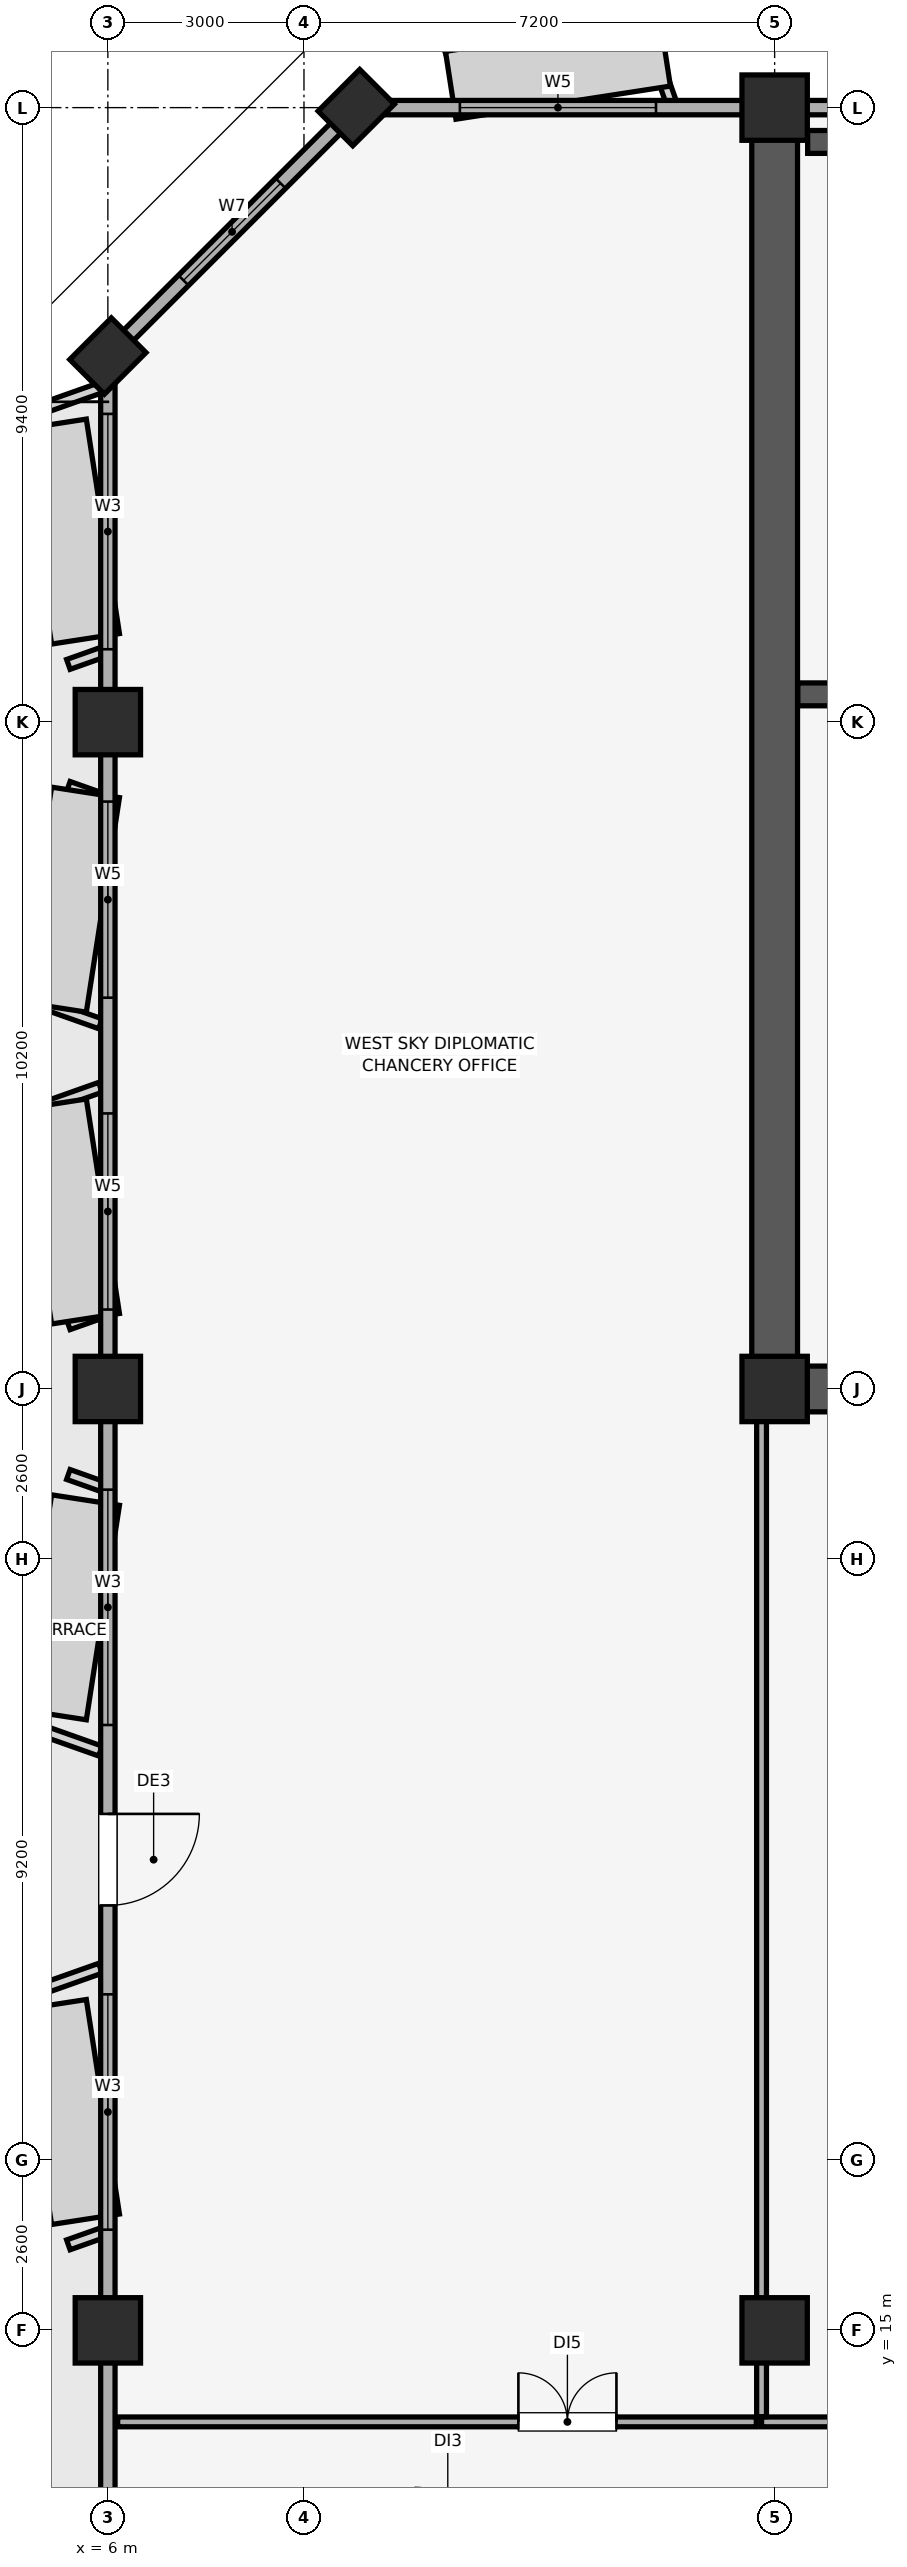
"""IFC4 building model, lengths in metres.
Left out: names, types, materials, properties, quantities, classifications, styles, units other than length and angle.
Written with IfcOpenShell. Run it as: python <this file> out.ifc"""

import sys

from ifc_helpers import new_model, si_unit, direction, frame, frame_2d, origin, origin_2d, place, context, subcontext, project, spatial, rectangle, extrude, element, fill, save


model = new_model("IFC4")
c1 = context("Model", 3, precision=1e-05, world=origin(), true_north=direction((0.0, 1.0)))
c2 = subcontext(c1, "Body", "Model", "MODEL_VIEW")
j1 = project(units=[si_unit("LENGTHUNIT", "METRE"), si_unit("PLANEANGLEUNIT", "RADIAN")], contexts=[c1])
p1 = place(None, origin())
s1 = spatial("IfcSite", under=j1, at=p1, CompositionType="ELEMENT")
p2 = place(p1, origin())
s2 = spatial("IfcBuilding", under=s1, at=p2, CompositionType="ELEMENT")
p3 = place(p2, frame((0.0, 0.0, 229.15)))
s3 = spatial("IfcBuildingStorey", under=s2, at=p3, CompositionType="ELEMENT", Elevation=229.15)
for number, where, z_axis, x_axis in (
    (1, (6.0, 15.0, 0.0), (0.0, 0.0, 1.0), (1.0, 0.0, 0.0)),
    (2, (6.0, 29.4, 0.0), (0.0, 0.0, 1.0), (1.0, 0.0, 0.0)),
    (3, (6.0, 39.6, 0.0), (0.0, 0.0, 1.0), (1.0, 0.0, 0.0)),
):
    element("IfcColumn", number, at=place(p3, frame(where, z_axis=z_axis, x_axis=x_axis)), inside=s3, PredefinedType="COLUMN", context=c2, shape_type="SweptSolid", body=[
        extrude(rectangle(XDim=1.0, YDim=1.0, at=origin_2d()), origin(), (0.0, 0.0, 1.0), 3.71),
    ])
for number, where, z_axis, x_axis in (
    (4, (9.8, 49.0, 0.0), (0.0, 0.0, 1.0), (0.707, 0.707, 0.0)),
    (5, (6.0, 45.2, 0.0), (0.0, 0.0, 1.0), (0.707, 0.707, 0.0)),
):
    element("IfcColumn", number, at=place(p3, frame(where, z_axis=z_axis, x_axis=x_axis)), inside=s3, PredefinedType="PILASTER", context=c2, shape_type="SweptSolid", body=[
        extrude(rectangle(XDim=0.9, YDim=0.75, at=origin_2d()), origin(), (0.0, 0.0, 1.0), 3.71),
    ])
for number, where, z_axis, x_axis in (
    (6, (16.2, 15.0, 0.0), (0.0, 0.0, 1.0), (1.0, 0.0, 0.0)),
    (7, (16.2, 29.4, 0.0), (0.0, 0.0, 1.0), (1.0, 0.0, 0.0)),
    (8, (16.2, 49.0, 0.0), (0.0, 0.0, 1.0), (1.0, 0.0, 0.0)),
):
    element("IfcColumn", number, at=place(p3, frame(where, z_axis=z_axis, x_axis=x_axis)), inside=s3, PredefinedType="COLUMN", context=c2, shape_type="SweptSolid", body=[
        extrude(rectangle(XDim=1.0, YDim=1.0, at=origin_2d()), origin(), (0.0, 0.0, 1.0), 3.71),
    ])
p4 = place(p3, frame((74.2, 49.0, 0.0), z_axis=(0.0, 0.0, 1.0), x_axis=(-1.0, 0.0, 0.0)))
e9 = element("IfcWall", 9, at=p4, inside=s3, PredefinedType="SOLIDWALL", context=c2, shape_type="SweptSolid", body=[
    extrude(rectangle(XDim=64.4, YDim=0.22, at=frame_2d((32.2, 0.0))), origin(), (0.0, 0.0, 1.0), 2.91),
])
p5 = place(p4, frame((59.815, 0.0, 0.85)))
e10 = element("IfcOpeningElement", 10, at=p5, cuts=e9, PredefinedType="OPENING", context=c2, shape_type="SweptSolid", body=[
    extrude(rectangle(XDim=3.0, YDim=1.5, at=frame_2d((1.5, 0.75))), frame((0.0, 0.12, 0.0), z_axis=(0.0, -1.0, 0.0), x_axis=(1.0, 0.0, 0.0)), (0.0, 0.0, 1.0), 0.24),
])
p6 = place(p4, frame((1.585, 0.0, 0.85)))
e11 = element("IfcOpeningElement", 11, at=p6, cuts=e9, PredefinedType="OPENING", context=c2, shape_type="SweptSolid", body=[
    extrude(rectangle(XDim=3.0, YDim=1.5, at=frame_2d((1.5, 0.75))), frame((0.0, 0.12, 0.0), z_axis=(0.0, -1.0, 0.0), x_axis=(1.0, 0.0, 0.0)), (0.0, 0.0, 1.0), 0.24),
])
p7 = place(p4, frame((44.715, 0.0, 0.9)))
e12 = element("IfcOpeningElement", 12, at=p7, cuts=e9, PredefinedType="OPENING", context=c2, shape_type="SweptSolid", body=[
    extrude(rectangle(XDim=3.6, YDim=1.5, at=frame_2d((1.8, 0.75))), frame((0.0, 0.12, 0.0), z_axis=(0.0, -1.0, 0.0), x_axis=(1.0, 0.0, 0.0)), (0.0, 0.0, 1.0), 0.24),
])
p8 = place(p4, frame((38.5, 0.0, 0.9)))
e13 = element("IfcOpeningElement", 13, at=p8, cuts=e9, PredefinedType="OPENING", context=c2, shape_type="SweptSolid", body=[
    extrude(rectangle(XDim=2.4, YDim=1.5, at=frame_2d((1.2, 0.75))), frame((0.0, 0.12, 0.0), z_axis=(0.0, -1.0, 0.0), x_axis=(1.0, 0.0, 0.0)), (0.0, 0.0, 1.0), 0.24),
])
p9 = place(p4, frame((21.75, 0.0, 0.9)))
e14 = element("IfcOpeningElement", 14, at=p9, cuts=e9, PredefinedType="OPENING", context=c2, shape_type="SweptSolid", body=[
    extrude(rectangle(XDim=3.0, YDim=1.5, at=frame_2d((1.5, 0.75))), frame((0.0, 0.12, 0.0), z_axis=(0.0, -1.0, 0.0), x_axis=(1.0, 0.0, 0.0)), (0.0, 0.0, 1.0), 0.24),
])
p10 = place(p4, frame((17.435, 0.0, 0.9)))
e15 = element("IfcOpeningElement", 15, at=p10, cuts=e9, PredefinedType="OPENING", context=c2, shape_type="SweptSolid", body=[
    extrude(rectangle(XDim=2.4, YDim=1.5, at=frame_2d((1.2, 0.75))), frame((0.0, 0.12, 0.0), z_axis=(0.0, -1.0, 0.0), x_axis=(1.0, 0.0, 0.0)), (0.0, 0.0, 1.0), 0.24),
])
p11 = place(p3, frame((9.8, 49.0, 0.0), z_axis=(0.0, 0.0, 1.0), x_axis=(-0.707106781187, -0.707106781187, 0.0)))
e16 = element("IfcWall", 16, at=p11, inside=s3, PredefinedType="SOLIDWALL", context=c2, shape_type="SweptSolid", body=[
    extrude(rectangle(XDim=5.374, YDim=0.22, at=frame_2d((2.687, 0.0))), origin(), (0.0, 0.0, 1.0), 2.91),
])
p12 = place(p11, frame((1.637, 0.0, 0.85)))
e17 = element("IfcOpeningElement", 17, at=p12, cuts=e16, PredefinedType="OPENING", context=c2, shape_type="SweptSolid", body=[
    extrude(rectangle(XDim=2.1, YDim=1.6, at=frame_2d((1.05, 0.8))), frame((0.0, 0.12, 0.0), z_axis=(0.0, -1.0, 0.0), x_axis=(1.0, 0.0, 0.0)), (0.0, 0.0, 1.0), 0.24),
])
p13 = place(p3, frame((6.0, 45.2, 0.0), z_axis=(0.0, 0.0, 1.0), x_axis=(0.0, -1.0, 0.0)))
e18 = element("IfcWall", 18, at=p13, inside=s3, PredefinedType="SOLIDWALL", context=c2, shape_type="SweptSolid", body=[
    extrude(rectangle(XDim=35.4, YDim=0.22, at=frame_2d((17.7, 0.0))), origin(), (0.0, 0.0, 1.0), 2.91),
])
p14 = place(p13, frame((22.3, 0.0, 0.0)))
e19 = element("IfcOpeningElement", 19, at=p14, cuts=e18, PredefinedType="OPENING", context=c2, shape_type="SweptSolid", body=[
    extrude(rectangle(XDim=1.4, YDim=2.2, at=frame_2d((0.7, 1.1))), frame((0.0, 0.12, 0.0), z_axis=(0.0, -1.0, 0.0), x_axis=(1.0, 0.0, 0.0)), (0.0, 0.0, 1.0), 0.24),
])
p15 = place(p13, frame((25.06, 0.0, 0.85)))
e20 = element("IfcOpeningElement", 20, at=p15, cuts=e18, PredefinedType="OPENING", context=c2, shape_type="SweptSolid", body=[
    extrude(rectangle(XDim=3.6, YDim=1.65, at=frame_2d((1.8, 0.825))), frame((0.0, 0.12, 0.0), z_axis=(0.0, -1.0, 0.0), x_axis=(1.0, 0.0, 0.0)), (0.0, 0.0, 1.0), 0.24),
])
p16 = place(p13, frame((17.34, 0.0, 0.85)))
e21 = element("IfcOpeningElement", 21, at=p16, cuts=e18, PredefinedType="OPENING", context=c2, shape_type="SweptSolid", body=[
    extrude(rectangle(XDim=3.6, YDim=1.65, at=frame_2d((1.8, 0.825))), frame((0.0, 0.12, 0.0), z_axis=(0.0, -1.0, 0.0), x_axis=(1.0, 0.0, 0.0)), (0.0, 0.0, 1.0), 0.24),
])
p17 = place(p13, frame((11.585, 0.0, 0.85)))
e22 = element("IfcOpeningElement", 22, at=p17, cuts=e18, PredefinedType="OPENING", context=c2, shape_type="SweptSolid", body=[
    extrude(rectangle(XDim=3.0, YDim=1.5, at=frame_2d((1.5, 0.75))), frame((0.0, 0.12, 0.0), z_axis=(0.0, -1.0, 0.0), x_axis=(1.0, 0.0, 0.0)), (0.0, 0.0, 1.0), 0.24),
])
p18 = place(p13, frame((6.815, 0.0, 0.85)))
e23 = element("IfcOpeningElement", 23, at=p18, cuts=e18, PredefinedType="OPENING", context=c2, shape_type="SweptSolid", body=[
    extrude(rectangle(XDim=3.0, YDim=1.5, at=frame_2d((1.5, 0.75))), frame((0.0, 0.12, 0.0), z_axis=(0.0, -1.0, 0.0), x_axis=(1.0, 0.0, 0.0)), (0.0, 0.0, 1.0), 0.24),
])
p19 = place(p13, frame((0.885, 0.0, 0.85)))
e24 = element("IfcOpeningElement", 24, at=p19, cuts=e18, PredefinedType="OPENING", context=c2, shape_type="SweptSolid", body=[
    extrude(rectangle(XDim=3.6, YDim=1.65, at=frame_2d((1.8, 0.825))), frame((0.0, 0.12, 0.0), z_axis=(0.0, -1.0, 0.0), x_axis=(1.0, 0.0, 0.0)), (0.0, 0.0, 1.0), 0.24),
])
p20 = place(p3, frame((16.2, 29.4, 0.0), z_axis=(0.0, 0.0, 1.0), x_axis=(0.0, 1.0, 0.0)))
e25 = element("IfcWall", 25, at=p20, inside=s3, PredefinedType="SHEAR", context=c2, shape_type="SweptSolid", body=[
    extrude(rectangle(XDim=19.2, YDim=0.7, at=frame_2d((9.6, 0.0))), origin(), (0.0, 0.0, 1.0), 3.71),
])
p21 = place(p3, frame((16.555, 29.4, 0.0), z_axis=(0.0, 0.0, 1.0), x_axis=(1.0, 0.0, 0.0)))
e26 = element("IfcWall", 26, at=p21, inside=s3, PredefinedType="SHEAR", context=c2, shape_type="SweptSolid", body=[
    extrude(rectangle(XDim=7.045, YDim=0.7, at=frame_2d((3.522, 0.0))), origin(), (0.0, 0.0, 1.0), 3.71),
])
p22 = place(p3, frame((16.555, 40.025, 0.0), z_axis=(0.0, 0.0, 1.0), x_axis=(1.0, 0.0, 0.0)))
e27 = element("IfcWall", 27, at=p22, inside=s3, PredefinedType="SHEAR", context=c2, shape_type="SweptSolid", body=[
    extrude(rectangle(XDim=4.3, YDim=0.35, at=frame_2d((2.15, 0.0))), origin(), (0.0, 0.0, 1.0), 3.71),
])
p23 = place(p22, frame((1.91, 0.0, 0.0)))
e28 = element("IfcOpeningElement", 28, at=p23, cuts=e27, PredefinedType="OPENING", context=c2, shape_type="SweptSolid", body=[
    extrude(rectangle(XDim=1.15, YDim=2.15, at=frame_2d((0.575, 1.075))), frame((0.0, 0.185, 0.0), z_axis=(0.0, -1.0, 0.0), x_axis=(1.0, 0.0, 0.0)), (0.0, 0.0, 1.0), 0.37),
])
p24 = place(p3, frame((16.705, 48.475, 0.0), z_axis=(0.0, 0.0, 1.0), x_axis=(1.0, 0.0, 0.0)))
e29 = element("IfcWall", 29, at=p24, inside=s3, PredefinedType="SHEAR", context=c2, shape_type="SweptSolid", body=[
    extrude(rectangle(XDim=4.15, YDim=0.35, at=frame_2d((2.075, 0.0))), origin(), (0.0, 0.0, 1.0), 3.71),
])
p25 = place(p3, frame((16.0, 13.6, 0.0), z_axis=(0.0, 0.0, 1.0), x_axis=(1.0, 0.0, 0.0)))
e30 = element("IfcWall", 30, at=p25, inside=s3, PredefinedType="PARTITIONING", context=c2, shape_type="SweptSolid", body=[
    extrude(rectangle(XDim=9.0, YDim=0.15, at=frame_2d((4.5, 0.0))), origin(), (0.0, 0.0, 1.0), 3.71),
])
p26 = place(p25, frame((4.0, 0.0, 0.0)))
e31 = element("IfcOpeningElement", 31, at=p26, cuts=e30, PredefinedType="OPENING", context=c2, shape_type="SweptSolid", body=[
    extrude(rectangle(XDim=1.0, YDim=2.15, at=frame_2d((0.5, 1.075))), frame((0.0, 0.085, 0.0), z_axis=(0.0, -1.0, 0.0), x_axis=(1.0, 0.0, 0.0)), (0.0, 0.0, 1.0), 0.17),
])
p27 = place(p3, frame((16.0, 13.68, 0.0), z_axis=(0.0, 0.0, 1.0), x_axis=(0.0, 1.0, 0.0)))
e32 = element("IfcWall", 32, at=p27, inside=s3, PredefinedType="PARTITIONING", context=c2, shape_type="SweptSolid", body=[
    extrude(rectangle(XDim=15.71, YDim=0.15, at=frame_2d((7.855, 0.0))), origin(), (0.0, 0.0, 1.0), 3.26),
])
p28 = place(p3, frame((6.15, 13.6, 0.0), z_axis=(0.0, 0.0, 1.0), x_axis=(1.0, 0.0, 0.0)))
e33 = element("IfcWall", 33, at=p28, inside=s3, PredefinedType="PARTITIONING", context=c2, shape_type="SweptSolid", body=[
    extrude(rectangle(XDim=9.77, YDim=0.15, at=frame_2d((4.885, 0.0))), origin(), (0.0, 0.0, 1.0), 3.71),
])
p29 = place(p28, frame((6.13, 0.0, 0.0)))
e34 = element("IfcOpeningElement", 34, at=p29, cuts=e33, PredefinedType="OPENING", context=c2, shape_type="SweptSolid", body=[
    extrude(rectangle(XDim=1.5, YDim=2.25, at=frame_2d((0.75, 1.125))), frame((0.0, 0.085, 0.0), z_axis=(0.0, -1.0, 0.0), x_axis=(1.0, 0.0, 0.0)), (0.0, 0.0, 1.0), 0.17),
])
p30 = place(p12, origin())
e35 = element("IfcWindow", 35, at=p30, inside=s3, PartitioningType="SINGLE_PANEL", PredefinedType="WINDOW", context=c2, shape_type="SweptSolid", body=[
    extrude(rectangle(XDim=2.1, YDim=1.6, at=frame_2d((1.05, 0.8))), frame((0.0, 0.03, 0.0), z_axis=(0.0, -1.0, 0.0), x_axis=(1.0, 0.0, 0.0)), (0.0, 0.0, 1.0), 0.06),
])
fill(e17, e35)
p31 = place(p14, origin())
e36 = element("IfcDoor", 36, at=p31, inside=s3, OperationType="SINGLE_SWING_LEFT", PredefinedType="DOOR", context=c2, shape_type="SweptSolid", body=[
    extrude(rectangle(XDim=1.4, YDim=2.2, at=frame_2d((0.7, 1.1))), frame((0.0, 0.025, 0.0), z_axis=(0.0, -1.0, 0.0), x_axis=(1.0, 0.0, 0.0)), (0.0, 0.0, 1.0), 0.05),
])
fill(e19, e36)
p32 = place(p15, origin())
e37 = element("IfcWindow", 37, at=p32, inside=s3, PartitioningType="SINGLE_PANEL", PredefinedType="WINDOW", context=c2, shape_type="SweptSolid", body=[
    extrude(rectangle(XDim=3.6, YDim=1.65, at=frame_2d((1.8, 0.825))), frame((0.0, 0.03, 0.0), z_axis=(0.0, -1.0, 0.0), x_axis=(1.0, 0.0, 0.0)), (0.0, 0.0, 1.0), 0.06),
])
fill(e20, e37)
p33 = place(p16, origin())
e38 = element("IfcWindow", 38, at=p33, inside=s3, PartitioningType="SINGLE_PANEL", PredefinedType="WINDOW", context=c2, shape_type="SweptSolid", body=[
    extrude(rectangle(XDim=3.6, YDim=1.65, at=frame_2d((1.8, 0.825))), frame((0.0, 0.03, 0.0), z_axis=(0.0, -1.0, 0.0), x_axis=(1.0, 0.0, 0.0)), (0.0, 0.0, 1.0), 0.06),
])
fill(e21, e38)
p34 = place(p17, origin())
e39 = element("IfcWindow", 39, at=p34, inside=s3, PartitioningType="SINGLE_PANEL", PredefinedType="WINDOW", context=c2, shape_type="SweptSolid", body=[
    extrude(rectangle(XDim=3.0, YDim=1.5, at=frame_2d((1.5, 0.75))), frame((0.0, 0.03, 0.0), z_axis=(0.0, -1.0, 0.0), x_axis=(1.0, 0.0, 0.0)), (0.0, 0.0, 1.0), 0.06),
])
fill(e22, e39)
p35 = place(p18, origin())
e40 = element("IfcWindow", 40, at=p35, inside=s3, PartitioningType="SINGLE_PANEL", PredefinedType="WINDOW", context=c2, shape_type="SweptSolid", body=[
    extrude(rectangle(XDim=3.0, YDim=1.5, at=frame_2d((1.5, 0.75))), frame((0.0, 0.03, 0.0), z_axis=(0.0, -1.0, 0.0), x_axis=(1.0, 0.0, 0.0)), (0.0, 0.0, 1.0), 0.06),
])
fill(e23, e40)
p36 = place(p19, origin())
e41 = element("IfcWindow", 41, at=p36, inside=s3, PartitioningType="SINGLE_PANEL", PredefinedType="WINDOW", context=c2, shape_type="SweptSolid", body=[
    extrude(rectangle(XDim=3.6, YDim=1.65, at=frame_2d((1.8, 0.825))), frame((0.0, 0.03, 0.0), z_axis=(0.0, -1.0, 0.0), x_axis=(1.0, 0.0, 0.0)), (0.0, 0.0, 1.0), 0.06),
])
fill(e24, e41)
p37 = place(p5, origin())
e42 = element("IfcWindow", 42, at=p37, inside=s3, PartitioningType="SINGLE_PANEL", PredefinedType="WINDOW", context=c2, shape_type="SweptSolid", body=[
    extrude(rectangle(XDim=3.0, YDim=1.5, at=frame_2d((1.5, 0.75))), frame((0.0, 0.03, 0.0), z_axis=(0.0, -1.0, 0.0), x_axis=(1.0, 0.0, 0.0)), (0.0, 0.0, 1.0), 0.06),
])
fill(e10, e42)
p38 = place(p29, origin())
e43 = element("IfcDoor", 43, at=p38, inside=s3, OperationType="DOUBLE_DOOR_SINGLE_SWING", PredefinedType="DOOR", context=c2, shape_type="SweptSolid", body=[
    extrude(rectangle(XDim=1.5, YDim=2.25, at=frame_2d((0.75, 1.125))), frame((0.0, 0.025, 0.0), z_axis=(0.0, -1.0, 0.0), x_axis=(1.0, 0.0, 0.0)), (0.0, 0.0, 1.0), 0.05),
])
fill(e34, e43)
save(model, sys.argv[1])
